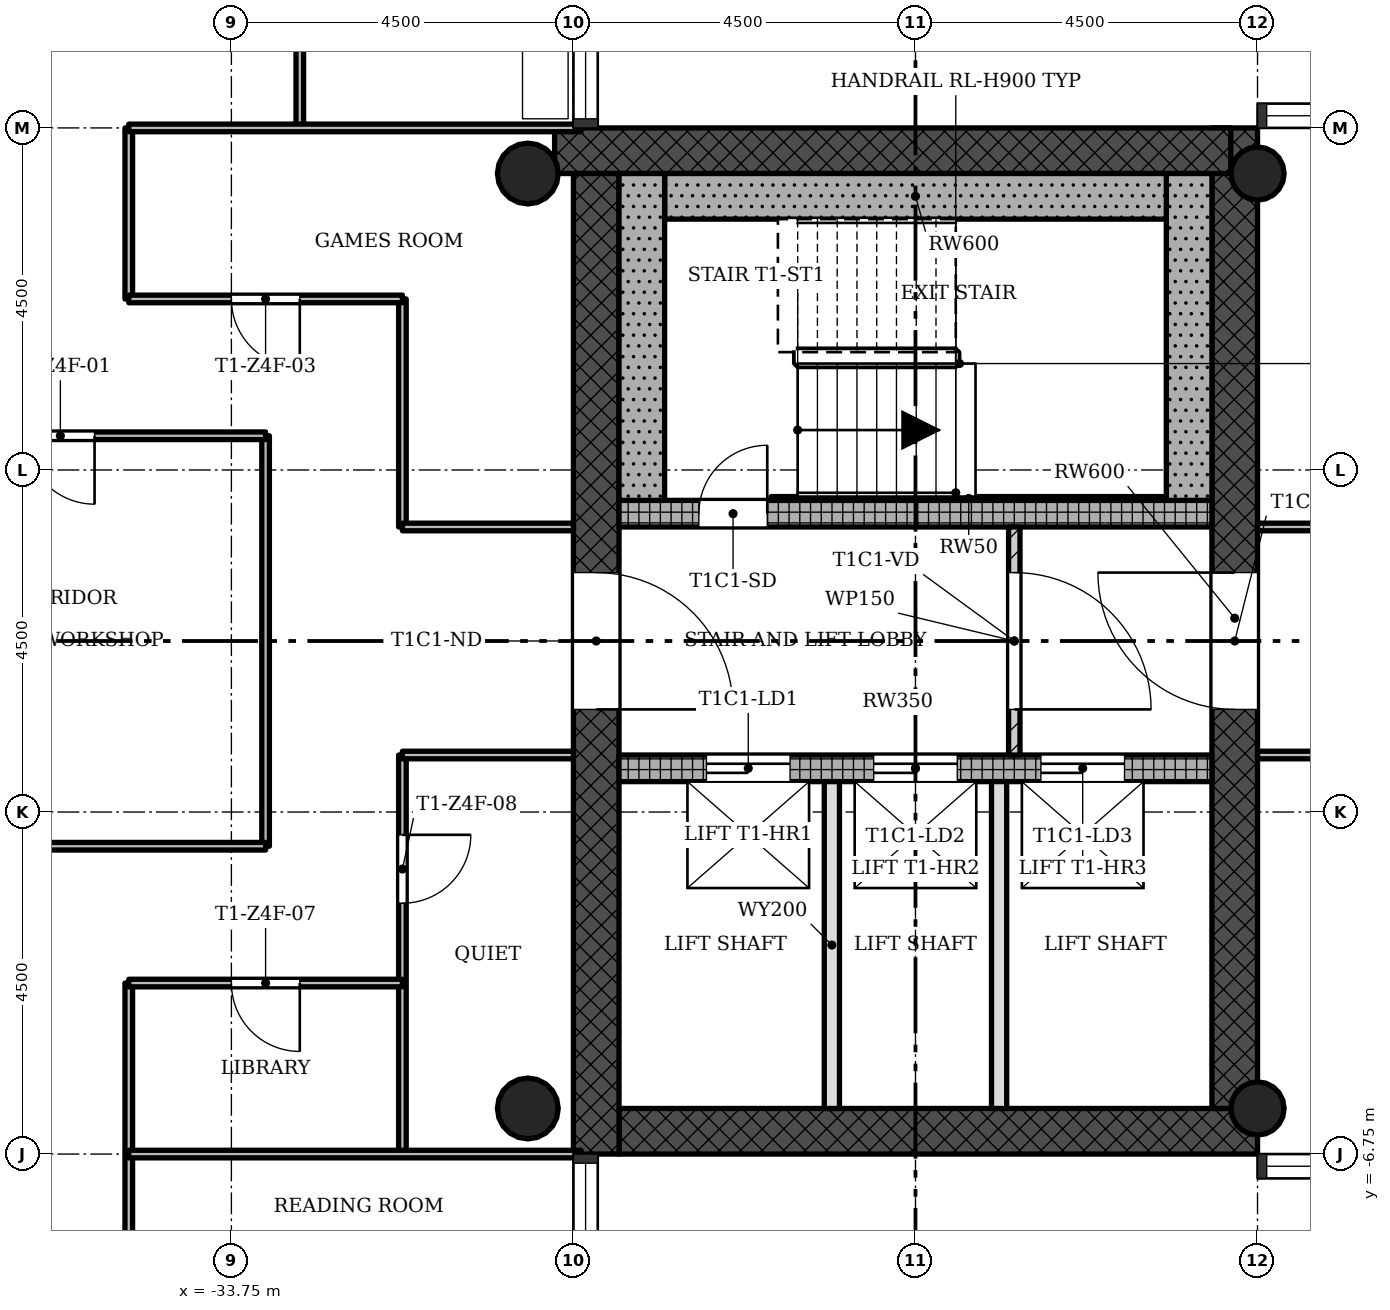
"""IFC4 building model, lengths in metres.
Left out: names, types, materials, properties, quantities, classifications, styles, units other than length and angle.
Written with IfcOpenShell. Run it as: python <this file> out.ifc"""

import sys

from ifc_helpers import new_model, si_unit, direction, frame, frame_2d, origin, origin_2d, place, context, subcontext, project, spatial, rectangle, hollow_circle, extrude, element, fill, save


model = new_model("IFC4")
c1 = context("Model", 3, precision=1e-05, world=origin(), true_north=direction((0.0, 1.0)))
c2 = subcontext(c1, "Body", "Model", "MODEL_VIEW")
j1 = project(units=[si_unit("LENGTHUNIT", "METRE"), si_unit("PLANEANGLEUNIT", "RADIAN")], contexts=[c1])
p1 = place(None, origin())
s1 = spatial("IfcSite", under=j1, at=p1, CompositionType="ELEMENT")
p2 = place(p1, origin())
s2 = spatial("IfcBuilding", under=s1, at=p2, CompositionType="ELEMENT")
p3 = place(p2, frame((0.0, 0.0, 219.8)))
s3 = spatial("IfcBuildingStorey", under=s2, at=p3, CompositionType="ELEMENT", Elevation=219.8)
p4 = place(p3, frame((-28.65, -6.45, 0.0), z_axis=(0.0, 0.0, 1.0), x_axis=(1.0, 0.0, 0.0)))
e1 = element("IfcWall", 1, at=p4, inside=s3, PredefinedType="SHEAR", context=c2, shape_type="SweptSolid", body=[
    extrude(rectangle(XDim=8.4, YDim=0.6, at=frame_2d((4.2, 0.0))), origin(), (0.0, 0.0, 1.0), 3.4),
])
p5 = place(p3, frame((-20.55, -6.15, 0.0), z_axis=(0.0, 0.0, 1.0), x_axis=(0.0, 1.0, 0.0)))
e2 = element("IfcWall", 2, at=p5, inside=s3, PredefinedType="SHEAR", context=c2, shape_type="SweptSolid", body=[
    extrude(rectangle(XDim=12.9, YDim=0.6, at=frame_2d((6.45, 0.0))), origin(), (0.0, 0.0, 1.0), 3.4),
])
p6 = place(p5, frame((5.25, 0.0, 0.0)))
e3 = element("IfcOpeningElement", 3, at=p6, cuts=e2, PredefinedType="OPENING", context=c2, shape_type="SweptSolid", body=[
    extrude(rectangle(XDim=1.8, YDim=2.1, at=frame_2d((0.9, 1.05))), frame((0.0, 0.31, 0.0), z_axis=(0.0, -1.0, 0.0), x_axis=(1.0, 0.0, 0.0)), (0.0, 0.0, 1.0), 0.62),
])
p7 = place(p3, frame((-20.602, 6.45, 0.0), z_axis=(0.0, 0.0, 1.0), x_axis=(-1.0, 0.0, 0.0)))
e4 = element("IfcWall", 4, at=p7, inside=s3, PredefinedType="SHEAR", context=c2, shape_type="SweptSolid", body=[
    extrude(rectangle(XDim=8.896, YDim=0.6, at=frame_2d((4.448, 0.0))), origin(), (0.0, 0.0, 1.0), 3.4),
])
p8 = place(p3, frame((-28.95, 6.15, 0.0), z_axis=(0.0, 0.0, 1.0), x_axis=(0.0, -1.0, 0.0)))
e5 = element("IfcWall", 5, at=p8, inside=s3, PredefinedType="SHEAR", context=c2, shape_type="SweptSolid", body=[
    extrude(rectangle(XDim=12.9, YDim=0.6, at=frame_2d((6.45, 0.0))), origin(), (0.0, 0.0, 1.0), 3.4),
])
p9 = place(p8, frame((5.25, 0.0, 0.0)))
e6 = element("IfcOpeningElement", 6, at=p9, cuts=e5, PredefinedType="OPENING", context=c2, shape_type="SweptSolid", body=[
    extrude(rectangle(XDim=1.8, YDim=2.1, at=frame_2d((0.9, 1.05))), frame((0.0, 0.31, 0.0), z_axis=(0.0, -1.0, 0.0), x_axis=(1.0, 0.0, 0.0)), (0.0, 0.0, 1.0), 0.62),
])
p10 = place(p3, frame((-28.65, -1.675, 0.0), z_axis=(0.0, 0.0, 1.0), x_axis=(1.0, 0.0, 0.0)))
e7 = element("IfcWall", 7, at=p10, inside=s3, PredefinedType="SHEAR", context=c2, shape_type="SweptSolid", body=[
    extrude(rectangle(XDim=7.8, YDim=0.35, at=frame_2d((3.9, 0.0))), origin(), (0.0, 0.0, 1.0), 3.4),
])
p11 = place(p10, frame((1.15, 0.0, 0.0)))
e8 = element("IfcOpeningElement", 8, at=p11, cuts=e7, PredefinedType="OPENING", context=c2, shape_type="SweptSolid", body=[
    extrude(rectangle(XDim=1.1, YDim=2.1, at=frame_2d((0.55, 1.05))), frame((0.0, 0.185, 0.0), z_axis=(0.0, -1.0, 0.0), x_axis=(1.0, 0.0, 0.0)), (0.0, 0.0, 1.0), 0.37),
])
p12 = place(p10, frame((3.35, 0.0, 0.0)))
e9 = element("IfcOpeningElement", 9, at=p12, cuts=e7, PredefinedType="OPENING", context=c2, shape_type="SweptSolid", body=[
    extrude(rectangle(XDim=1.1, YDim=2.1, at=frame_2d((0.55, 1.05))), frame((0.0, 0.185, 0.0), z_axis=(0.0, -1.0, 0.0), x_axis=(1.0, 0.0, 0.0)), (0.0, 0.0, 1.0), 0.37),
])
p13 = place(p10, frame((5.55, 0.0, 0.0)))
e10 = element("IfcOpeningElement", 10, at=p13, cuts=e7, PredefinedType="OPENING", context=c2, shape_type="SweptSolid", body=[
    extrude(rectangle(XDim=1.1, YDim=2.1, at=frame_2d((0.55, 1.05))), frame((0.0, 0.185, 0.0), z_axis=(0.0, -1.0, 0.0), x_axis=(1.0, 0.0, 0.0)), (0.0, 0.0, 1.0), 0.37),
])
p14 = place(p3, frame((-28.65, 1.675, 0.0), z_axis=(0.0, 0.0, 1.0), x_axis=(1.0, 0.0, 0.0)))
e11 = element("IfcWall", 11, at=p14, inside=s3, PredefinedType="SHEAR", context=c2, shape_type="SweptSolid", body=[
    extrude(rectangle(XDim=7.8, YDim=0.35, at=frame_2d((3.9, 0.0))), origin(), (0.0, 0.0, 1.0), 3.4),
])
p15 = place(p14, frame((1.05, 0.0, 0.0)))
e12 = element("IfcOpeningElement", 12, at=p15, cuts=e11, PredefinedType="OPENING", context=c2, shape_type="SweptSolid", body=[
    extrude(rectangle(XDim=0.9, YDim=2.1, at=frame_2d((0.45, 1.05))), frame((0.0, 0.185, 0.0), z_axis=(0.0, -1.0, 0.0), x_axis=(1.0, 0.0, 0.0)), (0.0, 0.0, 1.0), 0.37),
])
for number, where, z_axis, x_axis in (
    (13, (-20.25, -6.15, 0.0), (0.0, 0.0, 1.0), (1.0, 0.0, 0.0)),
    (14, (-20.25, 6.15, 0.0), (0.0, 0.0, 1.0), (1.0, 0.0, 0.0)),
):
    element("IfcColumn", number, at=place(p3, frame(where, z_axis=z_axis, x_axis=x_axis)), inside=s3, PredefinedType="COLUMN", context=c2, shape_type="SweptSolid", body=[
        extrude(hollow_circle(Radius=0.35, WallThickness=0.025, at=origin_2d()), origin(), (0.0, 0.0, 1.0), 3.4),
    ])
for number, where, z_axis, x_axis in (
    (15, (-29.85, -6.15, 0.0), (0.0, 0.0, 1.0), (1.0, 0.0, 0.0)),
    (16, (-29.85, 6.15, 0.0), (0.0, 0.0, 1.0), (1.0, 0.0, 0.0)),
):
    element("IfcColumn", number, at=place(p3, frame(where, z_axis=z_axis, x_axis=x_axis)), inside=s3, PredefinedType="COLUMN", context=c2, shape_type="SweptSolid", body=[
        extrude(hollow_circle(Radius=0.4, WallThickness=0.028, at=origin_2d()), origin(), (0.0, 0.0, 1.0), 3.4),
    ])
p16 = place(p3, frame((-23.45, -1.5, 0.0), z_axis=(0.0, 0.0, 1.0), x_axis=(0.0, 1.0, 0.0)))
e17 = element("IfcWall", 17, at=p16, inside=s3, PredefinedType="PARTITIONING", context=c2, shape_type="SweptSolid", body=[
    extrude(rectangle(XDim=3.0, YDim=0.15, at=frame_2d((1.5, 0.0))), origin(), (0.0, 0.0, 1.0), 3.0),
])
p17 = place(p16, frame((0.6, 0.0, 0.0)))
e18 = element("IfcOpeningElement", 18, at=p17, cuts=e17, PredefinedType="OPENING", context=c2, shape_type="SweptSolid", body=[
    extrude(rectangle(XDim=1.8, YDim=2.1, at=frame_2d((0.9, 1.05))), frame((0.0, 0.085, 0.0), z_axis=(0.0, -1.0, 0.0), x_axis=(1.0, 0.0, 0.0)), (0.0, 0.0, 1.0), 0.17),
])
for number, where, z_axis, x_axis in (
    (19, (-25.85, -6.15, 0.0), (0.0, 0.0, 1.0), (0.0, 1.0, 0.0)),
    (20, (-23.65, -6.15, 0.0), (0.0, 0.0, 1.0), (0.0, 1.0, 0.0)),
):
    element("IfcWall", number, at=place(p3, frame(where, z_axis=z_axis, x_axis=x_axis)), inside=s3, PredefinedType="SOLIDWALL", context=c2, shape_type="SweptSolid", body=[
        extrude(rectangle(XDim=4.3, YDim=0.2, at=frame_2d((2.15, 0.0))), origin(), (0.0, 0.0, 1.0), 3.0),
    ])
p18 = place(p3, frame((-35.1, -8.55, 0.0), z_axis=(0.0, 0.0, 1.0), x_axis=(0.0, 1.0, 0.0)))
e21 = element("IfcWall", 21, at=p18, inside=s3, PredefinedType="PARTITIONING", context=c2, shape_type="SweptSolid", body=[
    extrude(rectangle(XDim=4.05, YDim=0.1, at=frame_2d((2.025, 0.0))), origin(), (0.0, 0.0, 1.0), 3.0),
])
p19 = place(p3, frame((-35.1, 4.5, 0.0), z_axis=(0.0, 0.0, 1.0), x_axis=(0.0, 1.0, 0.0)))
e22 = element("IfcWall", 22, at=p19, inside=s3, PredefinedType="PARTITIONING", context=c2, shape_type="SweptSolid", body=[
    extrude(rectangle(XDim=2.25, YDim=0.1, at=frame_2d((1.125, 0.0))), origin(), (0.0, 0.0, 1.0), 3.0),
])
p20 = place(p3, frame((-33.3, -2.7, 0.0), z_axis=(0.0, 0.0, 1.0), x_axis=(0.0, 1.0, 0.0)))
e23 = element("IfcWall", 23, at=p20, inside=s3, PredefinedType="PARTITIONING", context=c2, shape_type="SweptSolid", body=[
    extrude(rectangle(XDim=5.4, YDim=0.1, at=frame_2d((2.7, 0.0))), origin(), (0.0, 0.0, 1.0), 3.0),
])
p21 = place(p3, frame((-32.85, 6.75, 0.0), z_axis=(0.0, 0.0, 1.0), x_axis=(0.0, 1.0, 0.0)))
e24 = element("IfcWall", 24, at=p21, inside=s3, PredefinedType="PARTITIONING", context=c2, shape_type="SweptSolid", body=[
    extrude(rectangle(XDim=4.5, YDim=0.1, at=frame_2d((2.25, 0.0))), origin(), (0.0, 0.0, 1.0), 3.0),
])
p22 = place(p21, frame((1.8, 0.0, 0.0)))
e25 = element("IfcOpeningElement", 25, at=p22, cuts=e24, PredefinedType="OPENING", context=c2, shape_type="SweptSolid", body=[
    extrude(rectangle(XDim=0.9, YDim=2.1, at=frame_2d((0.45, 1.05))), frame((0.0, 0.06, 0.0), z_axis=(0.0, -1.0, 0.0), x_axis=(1.0, 0.0, 0.0)), (0.0, 0.0, 1.0), 0.12),
])
p23 = place(p3, frame((-31.5, -6.75, 0.0), z_axis=(0.0, 0.0, 1.0), x_axis=(0.0, 1.0, 0.0)))
e26 = element("IfcWall", 26, at=p23, inside=s3, PredefinedType="PARTITIONING", context=c2, shape_type="SweptSolid", body=[
    extrude(rectangle(XDim=5.25, YDim=0.1, at=frame_2d((2.625, 0.0))), origin(), (0.0, 0.0, 1.0), 3.0),
])
p24 = place(p23, frame((3.3, 0.0, 0.0)))
e27 = element("IfcOpeningElement", 27, at=p24, cuts=e26, PredefinedType="OPENING", context=c2, shape_type="SweptSolid", body=[
    extrude(rectangle(XDim=0.9, YDim=2.1, at=frame_2d((0.45, 1.05))), frame((0.0, 0.06, 0.0), z_axis=(0.0, -1.0, 0.0), x_axis=(1.0, 0.0, 0.0)), (0.0, 0.0, 1.0), 0.12),
])
p25 = place(p3, frame((-31.5, 1.5, 0.0), z_axis=(0.0, 0.0, 1.0), x_axis=(0.0, 1.0, 0.0)))
e28 = element("IfcWall", 28, at=p25, inside=s3, PredefinedType="PARTITIONING", context=c2, shape_type="SweptSolid", body=[
    extrude(rectangle(XDim=3.0, YDim=0.1, at=frame_2d((1.5, 0.0))), origin(), (0.0, 0.0, 1.0), 3.0),
])
p26 = place(p3, frame((-35.1, -6.75, 0.0), z_axis=(0.0, 0.0, 1.0), x_axis=(1.0, 0.0, 0.0)))
e29 = element("IfcWall", 29, at=p26, inside=s3, PredefinedType="PARTITIONING", context=c2, shape_type="SweptSolid", body=[
    extrude(rectangle(XDim=5.95, YDim=0.1, at=frame_2d((2.975, 0.0))), origin(), (0.0, 0.0, 1.0), 3.0),
])
p27 = place(p3, frame((-35.1, -4.5, 0.0), z_axis=(0.0, 0.0, 1.0), x_axis=(1.0, 0.0, 0.0)))
e30 = element("IfcWall", 30, at=p27, inside=s3, PredefinedType="PARTITIONING", context=c2, shape_type="SweptSolid", body=[
    extrude(rectangle(XDim=3.6, YDim=0.1, at=frame_2d((1.8, 0.0))), origin(), (0.0, 0.0, 1.0), 3.0),
])
p28 = place(p27, frame((1.35, 0.0, 0.0)))
e31 = element("IfcOpeningElement", 31, at=p28, cuts=e30, PredefinedType="OPENING", context=c2, shape_type="SweptSolid", body=[
    extrude(rectangle(XDim=0.9, YDim=2.1, at=frame_2d((0.45, 1.05))), frame((0.0, 0.06, 0.0), z_axis=(0.0, -1.0, 0.0), x_axis=(1.0, 0.0, 0.0)), (0.0, 0.0, 1.0), 0.12),
])
p29 = place(p3, frame((-38.7, -2.7, 0.0), z_axis=(0.0, 0.0, 1.0), x_axis=(1.0, 0.0, 0.0)))
e32 = element("IfcWall", 32, at=p29, inside=s3, PredefinedType="PARTITIONING", context=c2, shape_type="SweptSolid", body=[
    extrude(rectangle(XDim=5.4, YDim=0.1, at=frame_2d((2.7, 0.0))), origin(), (0.0, 0.0, 1.0), 3.0),
])
p30 = place(p3, frame((-31.5, -1.5, 0.0), z_axis=(0.0, 0.0, 1.0), x_axis=(1.0, 0.0, 0.0)))
e33 = element("IfcWall", 33, at=p30, inside=s3, PredefinedType="PARTITIONING", context=c2, shape_type="SweptSolid", body=[
    extrude(rectangle(XDim=2.25, YDim=0.1, at=frame_2d((1.125, 0.0))), origin(), (0.0, 0.0, 1.0), 3.0),
])
p31 = place(p3, frame((-20.25, -1.5, 0.0), z_axis=(0.0, 0.0, 1.0), x_axis=(1.0, 0.0, 0.0)))
e34 = element("IfcWall", 34, at=p31, inside=s3, PredefinedType="PARTITIONING", context=c2, shape_type="SweptSolid", body=[
    extrude(rectangle(XDim=4.5, YDim=0.1, at=frame_2d((2.25, 0.0))), origin(), (0.0, 0.0, 1.0), 3.0),
])
p32 = place(p31, frame((1.8, 0.0, 0.0)))
e35 = element("IfcOpeningElement", 35, at=p32, cuts=e34, PredefinedType="OPENING", context=c2, shape_type="SweptSolid", body=[
    extrude(rectangle(XDim=0.9, YDim=2.1, at=frame_2d((0.45, 1.05))), frame((0.0, 0.06, 0.0), z_axis=(0.0, -1.0, 0.0), x_axis=(1.0, 0.0, 0.0)), (0.0, 0.0, 1.0), 0.12),
])
p33 = place(p3, frame((-31.5, 1.5, 0.0), z_axis=(0.0, 0.0, 1.0), x_axis=(1.0, 0.0, 0.0)))
e36 = element("IfcWall", 36, at=p33, inside=s3, PredefinedType="PARTITIONING", context=c2, shape_type="SweptSolid", body=[
    extrude(rectangle(XDim=2.25, YDim=0.1, at=frame_2d((1.125, 0.0))), origin(), (0.0, 0.0, 1.0), 3.0),
])
p34 = place(p3, frame((-20.25, 1.5, 0.0), z_axis=(0.0, 0.0, 1.0), x_axis=(1.0, 0.0, 0.0)))
e37 = element("IfcWall", 37, at=p34, inside=s3, PredefinedType="PARTITIONING", context=c2, shape_type="SweptSolid", body=[
    extrude(rectangle(XDim=4.5, YDim=0.1, at=frame_2d((2.25, 0.0))), origin(), (0.0, 0.0, 1.0), 3.0),
])
p35 = place(p34, frame((1.8, 0.0, 0.0)))
e38 = element("IfcOpeningElement", 38, at=p35, cuts=e37, PredefinedType="OPENING", context=c2, shape_type="SweptSolid", body=[
    extrude(rectangle(XDim=0.9, YDim=2.1, at=frame_2d((0.45, 1.05))), frame((0.0, 0.06, 0.0), z_axis=(0.0, -1.0, 0.0), x_axis=(1.0, 0.0, 0.0)), (0.0, 0.0, 1.0), 0.12),
])
p36 = place(p3, frame((-38.7, 2.7, 0.0), z_axis=(0.0, 0.0, 1.0), x_axis=(1.0, 0.0, 0.0)))
e39 = element("IfcWall", 39, at=p36, inside=s3, PredefinedType="PARTITIONING", context=c2, shape_type="SweptSolid", body=[
    extrude(rectangle(XDim=5.4, YDim=0.1, at=frame_2d((2.7, 0.0))), origin(), (0.0, 0.0, 1.0), 3.0),
])
p37 = place(p36, frame((2.25, 0.0, 0.0)))
e40 = element("IfcOpeningElement", 40, at=p37, cuts=e39, PredefinedType="OPENING", context=c2, shape_type="SweptSolid", body=[
    extrude(rectangle(XDim=0.9, YDim=2.1, at=frame_2d((0.45, 1.05))), frame((0.0, 0.06, 0.0), z_axis=(0.0, -1.0, 0.0), x_axis=(1.0, 0.0, 0.0)), (0.0, 0.0, 1.0), 0.12),
])
p38 = place(p3, frame((-35.1, 4.5, 0.0), z_axis=(0.0, 0.0, 1.0), x_axis=(1.0, 0.0, 0.0)))
e41 = element("IfcWall", 41, at=p38, inside=s3, PredefinedType="PARTITIONING", context=c2, shape_type="SweptSolid", body=[
    extrude(rectangle(XDim=3.6, YDim=0.1, at=frame_2d((1.8, 0.0))), origin(), (0.0, 0.0, 1.0), 3.0),
])
p39 = place(p38, frame((1.35, 0.0, 0.0)))
e42 = element("IfcOpeningElement", 42, at=p39, cuts=e41, PredefinedType="OPENING", context=c2, shape_type="SweptSolid", body=[
    extrude(rectangle(XDim=0.9, YDim=2.1, at=frame_2d((0.45, 1.05))), frame((0.0, 0.06, 0.0), z_axis=(0.0, -1.0, 0.0), x_axis=(1.0, 0.0, 0.0)), (0.0, 0.0, 1.0), 0.12),
])
p40 = place(p3, frame((-35.1, 6.75, 0.0), z_axis=(0.0, 0.0, 1.0), x_axis=(1.0, 0.0, 0.0)))
e43 = element("IfcWall", 43, at=p40, inside=s3, PredefinedType="PARTITIONING", context=c2, shape_type="SweptSolid", body=[
    extrude(rectangle(XDim=5.95, YDim=0.1, at=frame_2d((2.975, 0.0))), origin(), (0.0, 0.0, 1.0), 3.0),
])
p41 = place(p3, frame((-21.15, 1.85, 0.0), z_axis=(0.0, 0.0, 1.0), x_axis=(0.0, 1.0, 0.0)))
e44 = element("IfcWall", 44, at=p41, inside=s3, PredefinedType="SHEAR", context=c2, shape_type="SweptSolid", body=[
    extrude(rectangle(XDim=4.3, YDim=0.6, at=frame_2d((2.15, 0.0))), origin(), (0.0, 0.0, 1.0), 3.4),
])
p42 = place(p3, frame((-28.05, 5.85, 0.0), z_axis=(0.0, 0.0, 1.0), x_axis=(1.0, 0.0, 0.0)))
e45 = element("IfcWall", 45, at=p42, inside=s3, PredefinedType="SHEAR", context=c2, shape_type="SweptSolid", body=[
    extrude(rectangle(XDim=6.6, YDim=0.6, at=frame_2d((3.3, 0.0))), origin(), (0.0, 0.0, 1.0), 3.4),
])
p43 = place(p3, frame((-28.35, 1.85, 0.0), z_axis=(0.0, 0.0, 1.0), x_axis=(0.0, 1.0, 0.0)))
e46 = element("IfcWall", 46, at=p43, inside=s3, PredefinedType="SHEAR", context=c2, shape_type="SweptSolid", body=[
    extrude(rectangle(XDim=4.3, YDim=0.6, at=frame_2d((2.15, 0.0))), origin(), (0.0, 0.0, 1.0), 3.4),
])
p44 = place(p3, frame((-26.65, 1.875, 0.0), z_axis=(0.0, 0.0, 1.0), x_axis=(1.0, 0.0, 0.0)))
e47 = element("IfcWall", 47, at=p44, inside=s3, PredefinedType="SHEAR", context=c2, shape_type="SweptSolid", body=[
    extrude(rectangle(XDim=5.2, YDim=0.05, at=frame_2d((2.6, 0.0))), origin(), (0.0, 0.0, 1.0), 3.4),
])
p45 = place(p17, origin())
e48 = element("IfcDoor", 48, at=p45, inside=s3, OperationType="SINGLE_SWING_LEFT", PredefinedType="DOOR", context=c2, shape_type="SweptSolid", body=[
    extrude(rectangle(XDim=1.8, YDim=2.1, at=frame_2d((0.9, 1.05))), frame((0.0, 0.025, 0.0), z_axis=(0.0, -1.0, 0.0), x_axis=(1.0, 0.0, 0.0)), (0.0, 0.0, 1.0), 0.05),
])
fill(e18, e48)
p46 = place(p37, origin())
e49 = element("IfcDoor", 49, at=p46, inside=s3, OperationType="SINGLE_SWING_RIGHT", PredefinedType="DOOR", context=c2, shape_type="SweptSolid", body=[
    extrude(rectangle(XDim=0.9, YDim=2.1, at=frame_2d((0.45, 1.05))), frame((0.0, 0.025, 0.0), z_axis=(0.0, -1.0, 0.0), x_axis=(1.0, 0.0, 0.0)), (0.0, 0.0, 1.0), 0.05),
])
fill(e40, e49)
p47 = place(p39, origin())
e50 = element("IfcDoor", 50, at=p47, inside=s3, OperationType="SINGLE_SWING_RIGHT", PredefinedType="DOOR", context=c2, shape_type="SweptSolid", body=[
    extrude(rectangle(XDim=0.9, YDim=2.1, at=frame_2d((0.45, 1.05))), frame((0.0, 0.025, 0.0), z_axis=(0.0, -1.0, 0.0), x_axis=(1.0, 0.0, 0.0)), (0.0, 0.0, 1.0), 0.05),
])
fill(e42, e50)
p48 = place(p28, origin())
e51 = element("IfcDoor", 51, at=p48, inside=s3, OperationType="SINGLE_SWING_RIGHT", PredefinedType="DOOR", context=c2, shape_type="SweptSolid", body=[
    extrude(rectangle(XDim=0.9, YDim=2.1, at=frame_2d((0.45, 1.05))), frame((0.0, 0.025, 0.0), z_axis=(0.0, -1.0, 0.0), x_axis=(1.0, 0.0, 0.0)), (0.0, 0.0, 1.0), 0.05),
])
fill(e31, e51)
p49 = place(p24, origin())
e52 = element("IfcDoor", 52, at=p49, inside=s3, OperationType="SINGLE_SWING_RIGHT", PredefinedType="DOOR", context=c2, shape_type="SweptSolid", body=[
    extrude(rectangle(XDim=0.9, YDim=2.1, at=frame_2d((0.45, 1.05))), frame((0.0, 0.025, 0.0), z_axis=(0.0, -1.0, 0.0), x_axis=(1.0, 0.0, 0.0)), (0.0, 0.0, 1.0), 0.05),
])
fill(e27, e52)
p50 = place(p15, origin())
e53 = element("IfcDoor", 53, at=p50, inside=s3, OperationType="SINGLE_SWING_LEFT", PredefinedType="DOOR", context=c2, shape_type="SweptSolid", body=[
    extrude(rectangle(XDim=0.9, YDim=2.1, at=frame_2d((0.45, 1.05))), frame((0.0, 0.025, 0.0), z_axis=(0.0, -1.0, 0.0), x_axis=(1.0, 0.0, 0.0)), (0.0, 0.0, 1.0), 0.05),
])
fill(e12, e53)
p51 = place(p11, origin())
e54 = element("IfcDoor", 54, at=p51, inside=s3, OperationType="SLIDING_TO_LEFT", PredefinedType="DOOR", context=c2, shape_type="SweptSolid", body=[
    extrude(rectangle(XDim=1.1, YDim=2.1, at=frame_2d((0.55, 1.05))), frame((0.0, 0.025, 0.0), z_axis=(0.0, -1.0, 0.0), x_axis=(1.0, 0.0, 0.0)), (0.0, 0.0, 1.0), 0.05),
])
fill(e8, e54)
p52 = place(p12, origin())
e55 = element("IfcDoor", 55, at=p52, inside=s3, OperationType="SLIDING_TO_LEFT", PredefinedType="DOOR", context=c2, shape_type="SweptSolid", body=[
    extrude(rectangle(XDim=1.1, YDim=2.1, at=frame_2d((0.55, 1.05))), frame((0.0, 0.025, 0.0), z_axis=(0.0, -1.0, 0.0), x_axis=(1.0, 0.0, 0.0)), (0.0, 0.0, 1.0), 0.05),
])
fill(e9, e55)
p53 = place(p13, origin())
e56 = element("IfcDoor", 56, at=p53, inside=s3, OperationType="SLIDING_TO_LEFT", PredefinedType="DOOR", context=c2, shape_type="SweptSolid", body=[
    extrude(rectangle(XDim=1.1, YDim=2.1, at=frame_2d((0.55, 1.05))), frame((0.0, 0.025, 0.0), z_axis=(0.0, -1.0, 0.0), x_axis=(1.0, 0.0, 0.0)), (0.0, 0.0, 1.0), 0.05),
])
fill(e10, e56)
p54 = place(p9, origin())
e57 = element("IfcDoor", 57, at=p54, inside=s3, OperationType="SINGLE_SWING_LEFT", PredefinedType="DOOR", context=c2, shape_type="SweptSolid", body=[
    extrude(rectangle(XDim=1.8, YDim=2.1, at=frame_2d((0.9, 1.05))), frame((0.0, 0.025, 0.0), z_axis=(0.0, -1.0, 0.0), x_axis=(1.0, 0.0, 0.0)), (0.0, 0.0, 1.0), 0.05),
])
fill(e6, e57)
p55 = place(p6, origin())
e58 = element("IfcDoor", 58, at=p55, inside=s3, OperationType="SINGLE_SWING_LEFT", PredefinedType="DOOR", context=c2, shape_type="SweptSolid", body=[
    extrude(rectangle(XDim=1.8, YDim=2.1, at=frame_2d((0.9, 1.05))), frame((0.0, 0.025, 0.0), z_axis=(0.0, -1.0, 0.0), x_axis=(1.0, 0.0, 0.0)), (0.0, 0.0, 1.0), 0.05),
])
fill(e3, e58)
save(model, sys.argv[1])
